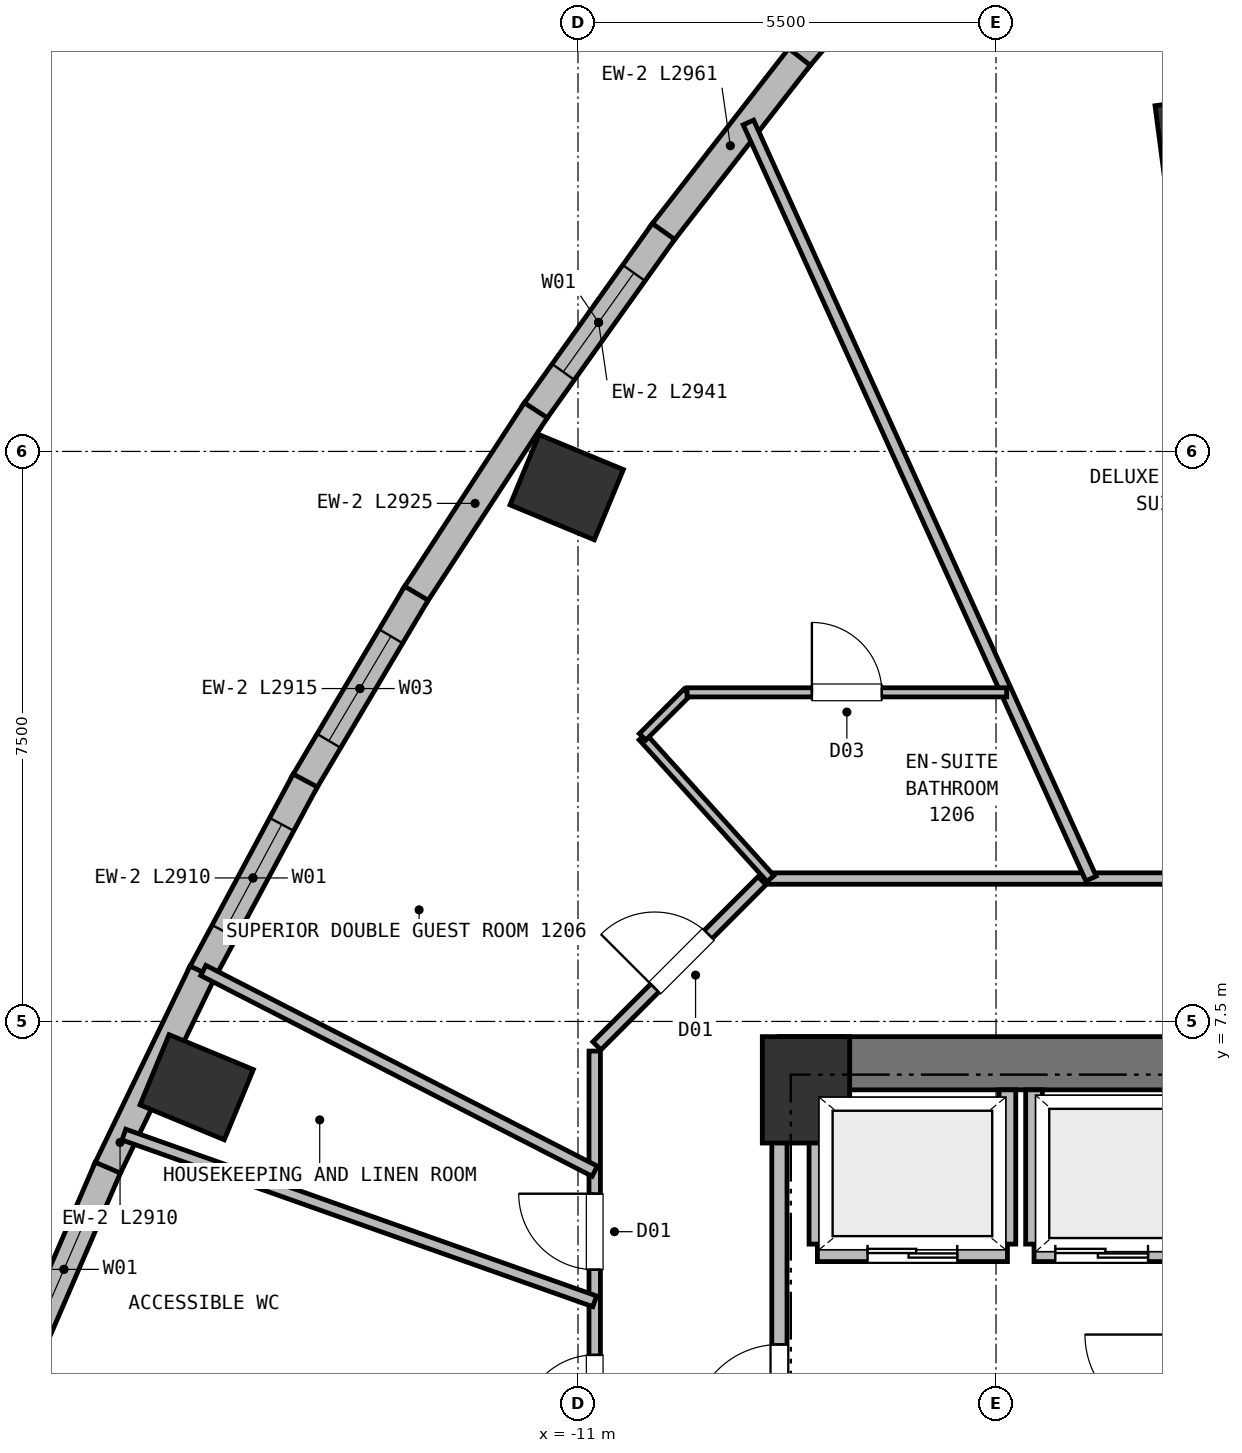
"""IFC4 building model, lengths in metres.
Left out: names, types, materials, properties, quantities, classifications, styles, units other than length and angle.
Written with IfcOpenShell. Run it as: python <this file> out.ifc"""

import sys

from ifc_helpers import new_model, si_unit, direction, frame, frame_2d, origin, origin_2d, place, context, subcontext, project, spatial, rectangle, extrude, element, fill, save


model = new_model("IFC4")
c1 = context("Model", 3, precision=1e-05, world=origin(), true_north=direction((0.0, 1.0)))
c2 = subcontext(c1, "Body", "Model", "MODEL_VIEW")
j1 = project(units=[si_unit("LENGTHUNIT", "METRE"), si_unit("PLANEANGLEUNIT", "RADIAN")], contexts=[c1])
p1 = place(None, origin())
s1 = spatial("IfcSite", under=j1, at=p1, CompositionType="ELEMENT")
p2 = place(p1, origin())
s2 = spatial("IfcBuilding", under=s1, at=p2, CompositionType="ELEMENT")
p3 = place(p2, frame((0.0, 0.0, 41.75)))
s3 = spatial("IfcBuildingStorey", under=s2, at=p3, CompositionType="ELEMENT", Elevation=41.75)
p4 = place(p3, frame((-8.0, 6.6, 0.0), z_axis=(0.0, 0.0, 1.0), x_axis=(1.0, 0.0, 0.0)))
e1 = element("IfcColumn", 1, at=p4, inside=s3, PredefinedType="COLUMN", context=c2, shape_type="SweptSolid", body=[
    extrude(rectangle(XDim=1.15, YDim=1.4, at=origin_2d()), origin(), (0.0, 0.0, 1.0), 3.75),
])
p5 = place(p3, frame((-8.35, 6.95, 0.0), z_axis=(0.0, 0.0, 1.0), x_axis=(1.0, 0.0, 0.0)))
e2 = element("IfcWall", 2, at=p5, inside=s3, PredefinedType="SHEAR", context=c2, shape_type="SweptSolid", body=[
    extrude(rectangle(XDim=16.7, YDim=0.7, at=frame_2d((8.35, 0.0))), origin(), (0.0, 0.0, 1.0), 3.5),
])
p6 = place(p3, frame((-2.2, 18.8, 0.0), z_axis=(0.0, 0.0, 1.0), x_axis=(-0.13052619222, 0.991444861374, 0.0)))
e3 = element("IfcColumn", 3, at=p6, inside=s3, PredefinedType="COLUMN", context=c2, shape_type="SweptSolid", body=[
    extrude(rectangle(XDim=1.8, YDim=2.2, at=origin_2d()), origin(), (0.0, 0.0, 1.0), 3.75),
])
for number, where, z_axis, x_axis in (
    (4, (-11.148, 14.529, 0.0), (0.0, 0.0, 1.0), (0.383, 0.924, 0.0)),
    (5, (-16.017, 6.635, 0.0), (0.0, 0.0, 1.0), (0.383, 0.924, 0.0)),
):
    element("IfcColumn", number, at=place(p3, frame(where, z_axis=z_axis, x_axis=x_axis)), inside=s3, PredefinedType="COLUMN", context=c2, shape_type="SweptSolid", body=[
        extrude(rectangle(XDim=1.0, YDim=1.2, at=origin_2d()), origin(), (0.0, 0.0, 1.0), 3.75),
    ])
p7 = place(p3, frame((-8.117, 20.153, 0.0), z_axis=(0.0, 0.0, 1.0), x_axis=(0.645802996195, 0.763504086502, 0.0)))
e6 = element("IfcWall", 6, at=p7, inside=s3, PredefinedType="SOLIDWALL", context=c2, shape_type="SweptSolid", body=[
    extrude(rectangle(XDim=2.987, YDim=0.36, at=frame_2d((1.493, 0.0))), origin(), (0.0, 0.0, 1.0), 3.5),
])
p8 = place(p7, frame((0.694, 0.0, 0.72)))
e7 = element("IfcOpeningElement", 7, at=p8, cuts=e6, PredefinedType="OPENING", context=c2, shape_type="SweptSolid", body=[
    extrude(rectangle(XDim=1.6, YDim=1.88, at=frame_2d((0.8, 0.94))), frame((0.0, 0.19, 0.0), z_axis=(0.0, -1.0, 0.0), x_axis=(1.0, 0.0, 0.0)), (0.0, 0.0, 1.0), 0.38),
])
p9 = place(p3, frame((-9.905, 17.854, 0.0), z_axis=(0.0, 0.0, 1.0), x_axis=(0.614163171733, 0.789179066174, 0.0)))
e8 = element("IfcWall", 8, at=p9, inside=s3, PredefinedType="SOLIDWALL", context=c2, shape_type="SweptSolid", body=[
    extrude(rectangle(XDim=2.961, YDim=0.36, at=frame_2d((1.481, 0.0))), origin(), (0.0, 0.0, 1.0), 3.5),
])
p10 = place(p3, frame((-11.583, 15.5, 0.0), z_axis=(0.0, 0.0, 1.0), x_axis=(0.580782634392, 0.814058678222, 0.0)))
e9 = element("IfcWall", 9, at=p10, inside=s3, PredefinedType="SOLIDWALL", context=c2, shape_type="SweptSolid", body=[
    extrude(rectangle(XDim=2.941, YDim=0.36, at=frame_2d((1.47, 0.0))), origin(), (0.0, 0.0, 1.0), 3.5),
])
p11 = place(p10, frame((0.67, 0.0, 0.72)))
e10 = element("IfcOpeningElement", 10, at=p11, cuts=e9, PredefinedType="OPENING", context=c2, shape_type="SweptSolid", body=[
    extrude(rectangle(XDim=1.6, YDim=1.88, at=frame_2d((0.8, 0.94))), frame((0.0, 0.19, 0.0), z_axis=(0.0, -1.0, 0.0), x_axis=(1.0, 0.0, 0.0)), (0.0, 0.0, 1.0), 0.38),
])
p12 = place(p3, frame((-13.153, 13.091, 0.0), z_axis=(0.0, 0.0, 1.0), x_axis=(0.546158304601, 0.837681983998, 0.0)))
e11 = element("IfcWall", 11, at=p12, inside=s3, PredefinedType="SOLIDWALL", context=c2, shape_type="SweptSolid", body=[
    extrude(rectangle(XDim=2.925, YDim=0.36, at=frame_2d((1.463, 0.0))), origin(), (0.0, 0.0, 1.0), 3.5),
])
p13 = place(p3, frame((-14.613, 10.626, 0.0), z_axis=(0.0, 0.0, 1.0), x_axis=(0.510091648533, 0.86012005563, 0.0)))
e12 = element("IfcWall", 12, at=p13, inside=s3, PredefinedType="SOLIDWALL", context=c2, shape_type="SweptSolid", body=[
    extrude(rectangle(XDim=2.915, YDim=0.36, at=frame_2d((1.458, 0.0))), origin(), (0.0, 0.0, 1.0), 3.5),
])
p14 = place(p13, frame((0.657, 0.0, 0.72)))
e13 = element("IfcOpeningElement", 13, at=p14, cuts=e12, PredefinedType="OPENING", context=c2, shape_type="SweptSolid", body=[
    extrude(rectangle(XDim=1.6, YDim=1.88, at=frame_2d((0.8, 0.94))), frame((0.0, 0.19, 0.0), z_axis=(0.0, -1.0, 0.0), x_axis=(1.0, 0.0, 0.0)), (0.0, 0.0, 1.0), 0.38),
])
p15 = place(p3, frame((-15.964, 8.106, 0.0), z_axis=(0.0, 0.0, 1.0), x_axis=(0.472903509286, 0.881114221259, 0.0)))
e14 = element("IfcWall", 14, at=p15, inside=s3, PredefinedType="SOLIDWALL", context=c2, shape_type="SweptSolid", body=[
    extrude(rectangle(XDim=2.91, YDim=0.36, at=frame_2d((1.455, 0.0))), origin(), (0.0, 0.0, 1.0), 3.5),
])
p16 = place(p15, frame((0.655, 0.0, 0.72)))
e15 = element("IfcOpeningElement", 15, at=p16, cuts=e14, PredefinedType="OPENING", context=c2, shape_type="SweptSolid", body=[
    extrude(rectangle(XDim=1.6, YDim=1.88, at=frame_2d((0.8, 0.94))), frame((0.0, 0.19, 0.0), z_axis=(0.0, -1.0, 0.0), x_axis=(1.0, 0.0, 0.0)), (0.0, 0.0, 1.0), 0.38),
])
p17 = place(p3, frame((-17.207, 5.531, 0.0), z_axis=(0.0, 0.0, 1.0), x_axis=(0.434819461164, 0.900517649018, 0.0)))
e16 = element("IfcWall", 16, at=p17, inside=s3, PredefinedType="SOLIDWALL", context=c2, shape_type="SweptSolid", body=[
    extrude(rectangle(XDim=2.91, YDim=0.36, at=frame_2d((1.455, 0.0))), origin(), (0.0, 0.0, 1.0), 3.5),
])
p18 = place(p3, frame((-18.341, 2.899, 0.0), z_axis=(0.0, 0.0, 1.0), x_axis=(0.396050960204, 0.918228531969, 0.0)))
e17 = element("IfcWall", 17, at=p18, inside=s3, PredefinedType="SOLIDWALL", context=c2, shape_type="SweptSolid", body=[
    extrude(rectangle(XDim=2.915, YDim=0.36, at=frame_2d((1.458, 0.0))), origin(), (0.0, 0.0, 1.0), 3.5),
])
p19 = place(p18, frame((0.657, 0.0, 0.72)))
e18 = element("IfcOpeningElement", 18, at=p19, cuts=e17, PredefinedType="OPENING", context=c2, shape_type="SweptSolid", body=[
    extrude(rectangle(XDim=1.6, YDim=1.88, at=frame_2d((0.8, 0.94))), frame((0.0, 0.19, 0.0), z_axis=(0.0, -1.0, 0.0), x_axis=(1.0, 0.0, 0.0)), (0.0, 0.0, 1.0), 0.38),
])
p20 = place(p3, frame((-7.85, 4.45, 0.0), z_axis=(0.0, 0.0, 1.0), x_axis=(1.0, 0.0, 0.0)))
e19 = element("IfcWall", 19, at=p20, inside=s3, PredefinedType="PARTITIONING", context=c2, shape_type="SweptSolid", body=[
    extrude(rectangle(XDim=2.5, YDim=0.22, at=frame_2d((1.25, 0.0))), origin(), (0.0, 0.0, 1.0), 3.5),
])
p21 = place(p20, frame((0.66, 0.0, 0.0)))
e20 = element("IfcOpeningElement", 20, at=p21, cuts=e19, PredefinedType="OPENING", context=c2, shape_type="SweptSolid", body=[
    extrude(rectangle(XDim=1.18, YDim=2.15, at=frame_2d((0.59, 1.075))), frame((0.0, 0.12, 0.0), z_axis=(0.0, -1.0, 0.0), x_axis=(1.0, 0.0, 0.0)), (0.0, 0.0, 1.0), 0.24),
])
p22 = place(p3, frame((-7.85, 4.57, 0.0), z_axis=(0.0, 0.0, 1.0), x_axis=(0.0, 1.0, 0.0)))
e21 = element("IfcWall", 21, at=p22, inside=s3, PredefinedType="PARTITIONING", context=c2, shape_type="SweptSolid", body=[
    extrude(rectangle(XDim=2.03, YDim=0.22, at=frame_2d((1.015, 0.0))), origin(), (0.0, 0.0, 1.0), 3.08),
])
p23 = place(p3, frame((-5.35, 4.57, 0.0), z_axis=(0.0, 0.0, 1.0), x_axis=(0.0, 1.0, 0.0)))
e22 = element("IfcWall", 22, at=p23, inside=s3, PredefinedType="PARTITIONING", context=c2, shape_type="SweptSolid", body=[
    extrude(rectangle(XDim=2.03, YDim=0.22, at=frame_2d((1.015, 0.0))), origin(), (0.0, 0.0, 1.0), 3.5),
])
p24 = place(p3, frame((-5.0, 4.45, 0.0), z_axis=(0.0, 0.0, 1.0), x_axis=(1.0, 0.0, 0.0)))
e23 = element("IfcWall", 23, at=p24, inside=s3, PredefinedType="PARTITIONING", context=c2, shape_type="SweptSolid", body=[
    extrude(rectangle(XDim=2.4, YDim=0.22, at=frame_2d((1.2, 0.0))), origin(), (0.0, 0.0, 1.0), 3.5),
])
p25 = place(p24, frame((0.28, 0.0, 0.0)))
e24 = element("IfcOpeningElement", 24, at=p25, cuts=e23, PredefinedType="OPENING", context=c2, shape_type="SweptSolid", body=[
    extrude(rectangle(XDim=1.22, YDim=2.15, at=frame_2d((0.61, 1.075))), frame((0.0, 0.12, 0.0), z_axis=(0.0, -1.0, 0.0), x_axis=(1.0, 0.0, 0.0)), (0.0, 0.0, 1.0), 0.24),
])
p26 = place(p3, frame((-5.0, 4.57, 0.0), z_axis=(0.0, 0.0, 1.0), x_axis=(0.0, 1.0, 0.0)))
e25 = element("IfcWall", 25, at=p26, inside=s3, PredefinedType="PARTITIONING", context=c2, shape_type="SweptSolid", body=[
    extrude(rectangle(XDim=2.03, YDim=0.22, at=frame_2d((1.015, 0.0))), origin(), (0.0, 0.0, 1.0), 3.5),
])
p27 = place(p3, frame((-8.35, 1.15, 0.0), z_axis=(0.0, 0.0, 1.0), x_axis=(0.0, 1.0, 0.0)))
e26 = element("IfcWall", 26, at=p27, inside=s3, PredefinedType="PARTITIONING", context=c2, shape_type="SweptSolid", body=[
    extrude(rectangle(XDim=5.4, YDim=0.2, at=frame_2d((2.7, 0.0))), origin(), (0.0, 0.0, 1.0), 3.5),
])
p28 = place(p27, frame((0.95, 0.0, 0.0)))
e27 = element("IfcOpeningElement", 27, at=p28, cuts=e26, PredefinedType="OPENING", context=c2, shape_type="SweptSolid", body=[
    extrude(rectangle(XDim=1.15, YDim=2.15, at=frame_2d((0.575, 1.075))), frame((0.0, 0.11, 0.0), z_axis=(0.0, -1.0, 0.0), x_axis=(1.0, 0.0, 0.0)), (0.0, 0.0, 1.0), 0.22),
])
p29 = place(p3, frame((-8.51, 9.38, 0.0), z_axis=(0.0, 0.0, 1.0), x_axis=(1.0, 0.0, 0.0)))
e28 = element("IfcWall", 28, at=p29, inside=s3, PredefinedType="PARTITIONING", context=c2, shape_type="SweptSolid", body=[
    extrude(rectangle(XDim=17.02, YDim=0.15, at=frame_2d((8.51, 0.0))), origin(), (0.0, 0.0, 1.0), 3.5),
])
p30 = place(p29, frame((11.971, 0.0, 0.0)))
e29 = element("IfcOpeningElement", 29, at=p30, cuts=e28, PredefinedType="OPENING", context=c2, shape_type="SweptSolid", body=[
    extrude(rectangle(XDim=1.06, YDim=2.15, at=frame_2d((0.53, 1.075))), frame((0.0, 0.085, 0.0), z_axis=(0.0, -1.0, 0.0), x_axis=(1.0, 0.0, 0.0)), (0.0, 0.0, 1.0), 0.17),
])
p31 = place(p29, frame((5.492, 0.0, 0.0)))
e30 = element("IfcOpeningElement", 30, at=p31, cuts=e28, PredefinedType="OPENING", context=c2, shape_type="SweptSolid", body=[
    extrude(rectangle(XDim=1.06, YDim=2.15, at=frame_2d((0.53, 1.075))), frame((0.0, 0.085, 0.0), z_axis=(0.0, -1.0, 0.0), x_axis=(1.0, 0.0, 0.0)), (0.0, 0.0, 1.0), 0.17),
])
p32 = place(p3, frame((-10.752, 7.178, 0.0), z_axis=(0.0, 0.0, 1.0), x_axis=(0.707067066127, 0.707146494016, 0.0)))
e31 = element("IfcWall", 31, at=p32, inside=s3, PredefinedType="PARTITIONING", context=c2, shape_type="SweptSolid", body=[
    extrude(rectangle(XDim=3.074, YDim=0.15, at=frame_2d((1.537, 0.0))), origin(), (0.0, 0.0, 1.0), 3.5),
])
p33 = place(p32, frame((1.077, 0.0, 0.0)))
e32 = element("IfcOpeningElement", 32, at=p33, cuts=e31, PredefinedType="OPENING", context=c2, shape_type="SweptSolid", body=[
    extrude(rectangle(XDim=1.0, YDim=2.15, at=frame_2d((0.5, 1.075))), frame((0.0, 0.085, 0.0), z_axis=(0.0, -1.0, 0.0), x_axis=(1.0, 0.0, 0.0)), (0.0, 0.0, 1.0), 0.17),
])
p34 = place(p3, frame((-10.78, -7.11, 0.0), z_axis=(0.0, 0.0, 1.0), x_axis=(0.0, 1.0, 0.0)))
e33 = element("IfcWall", 33, at=p34, inside=s3, PredefinedType="PARTITIONING", context=c2, shape_type="SweptSolid", body=[
    extrude(rectangle(XDim=14.22, YDim=0.15, at=frame_2d((7.11, 0.0))), origin(), (0.0, 0.0, 1.0), 3.12),
])
p35 = place(p34, frame((11.344, 0.0, 0.0)))
e34 = element("IfcOpeningElement", 34, at=p35, cuts=e33, PredefinedType="OPENING", context=c2, shape_type="SweptSolid", body=[
    extrude(rectangle(XDim=1.0, YDim=2.15, at=frame_2d((0.5, 1.075))), frame((0.0, 0.085, 0.0), z_axis=(0.0, -1.0, 0.0), x_axis=(1.0, 0.0, 0.0)), (0.0, 0.0, 1.0), 0.17),
])
p36 = place(p34, frame((9.272, 0.0, 0.0)))
e35 = element("IfcOpeningElement", 35, at=p36, cuts=e33, PredefinedType="OPENING", context=c2, shape_type="SweptSolid", body=[
    extrude(rectangle(XDim=0.95, YDim=2.1, at=frame_2d((0.475, 1.05))), frame((0.0, 0.085, 0.0), z_axis=(0.0, -1.0, 0.0), x_axis=(1.0, 0.0, 0.0)), (0.0, 0.0, 1.0), 0.17),
])
p37 = place(p34, frame((3.035, 0.0, 0.0)))
e36 = element("IfcOpeningElement", 36, at=p37, cuts=e33, PredefinedType="OPENING", context=c2, shape_type="SweptSolid", body=[
    extrude(rectangle(XDim=1.06, YDim=2.15, at=frame_2d((0.53, 1.075))), frame((0.0, 0.085, 0.0), z_axis=(0.0, -1.0, 0.0), x_axis=(1.0, 0.0, 0.0)), (0.0, 0.0, 1.0), 0.17),
])
p38 = place(p3, frame((-4.25, 9.38, 0.0), z_axis=(0.0, 0.0, 1.0), x_axis=(-0.412704587387, 0.910864931562, 0.0)))
e37 = element("IfcWall", 37, at=p38, inside=s3, PredefinedType="PARTITIONING", context=c2, shape_type="SweptSolid", body=[
    extrude(rectangle(XDim=10.922, YDim=0.15, at=frame_2d((5.461, 0.0))), origin(), (0.0, 0.0, 1.0), 3.5),
])
p39 = place(p3, frame((-10.15, 11.245, 0.0), z_axis=(0.0, 0.0, 1.0), x_axis=(0.670080782296, -0.742288182041, 0.0)))
e38 = element("IfcWall", 38, at=p39, inside=s3, PredefinedType="PARTITIONING", context=c2, shape_type="SweptSolid", body=[
    extrude(rectangle(XDim=2.512, YDim=0.12, at=frame_2d((1.256, 0.0))), origin(), (0.0, 0.0, 1.0), 3.5),
])
p40 = place(p3, frame((-10.15, 11.245, 0.0), z_axis=(0.0, 0.0, 1.0), x_axis=(0.707106781187, 0.707106781187, 0.0)))
e39 = element("IfcWall", 39, at=p40, inside=s3, PredefinedType="PARTITIONING", context=c2, shape_type="SweptSolid", body=[
    extrude(rectangle(XDim=0.828, YDim=0.12, at=frame_2d((0.414, 0.0))), origin(), (0.0, 0.0, 1.0), 3.5),
])
p41 = place(p3, frame((-9.565, 11.83, 0.0), z_axis=(0.0, 0.0, 1.0), x_axis=(1.0, 0.0, 0.0)))
e40 = element("IfcWall", 40, at=p41, inside=s3, PredefinedType="PARTITIONING", context=c2, shape_type="SweptSolid", body=[
    extrude(rectangle(XDim=4.205, YDim=0.12, at=frame_2d((2.102, 0.0))), origin(), (0.0, 0.0, 1.0), 3.5),
])
p42 = place(p41, frame((1.642, 0.0, 0.0)))
e41 = element("IfcOpeningElement", 41, at=p42, cuts=e40, PredefinedType="OPENING", context=c2, shape_type="SweptSolid", body=[
    extrude(rectangle(XDim=0.92, YDim=2.1, at=frame_2d((0.46, 1.05))), frame((0.0, 0.07, 0.0), z_axis=(0.0, -1.0, 0.0), x_axis=(1.0, 0.0, 0.0)), (0.0, 0.0, 1.0), 0.14),
])
p43 = place(p3, frame((-10.78, 5.53, 0.0), z_axis=(0.0, 0.0, 1.0), x_axis=(-0.889781886096, 0.456386015535, 0.0)))
e42 = element("IfcWall", 42, at=p43, inside=s3, PredefinedType="PARTITIONING", context=c2, shape_type="SweptSolid", body=[
    extrude(rectangle(XDim=5.788, YDim=0.15, at=frame_2d((2.894, 0.0))), origin(), (0.0, 0.0, 1.0), 3.5),
])
p44 = place(p3, frame((-10.78, 3.817, 0.0), z_axis=(0.0, 0.0, 1.0), x_axis=(-0.942646221325, 0.333793501167, 0.0)))
e43 = element("IfcWall", 43, at=p44, inside=s3, PredefinedType="PARTITIONING", context=c2, shape_type="SweptSolid", body=[
    extrude(rectangle(XDim=6.572, YDim=0.15, at=frame_2d((3.286, 0.0))), origin(), (0.0, 0.0, 1.0), 3.5),
])
p45 = place(p11, origin())
e44 = element("IfcWindow", 44, at=p45, inside=s3, PartitioningType="SINGLE_PANEL", PredefinedType="WINDOW", context=c2, shape_type="SweptSolid", body=[
    extrude(rectangle(XDim=1.6, YDim=1.88, at=frame_2d((0.8, 0.94))), frame((0.0, 0.03, 0.0), z_axis=(0.0, -1.0, 0.0), x_axis=(1.0, 0.0, 0.0)), (0.0, 0.0, 1.0), 0.06),
])
fill(e10, e44)
p46 = place(p14, origin())
e45 = element("IfcWindow", 45, at=p46, inside=s3, PartitioningType="SINGLE_PANEL", PredefinedType="WINDOW", context=c2, shape_type="SweptSolid", body=[
    extrude(rectangle(XDim=1.6, YDim=1.88, at=frame_2d((0.8, 0.94))), frame((0.0, 0.03, 0.0), z_axis=(0.0, -1.0, 0.0), x_axis=(1.0, 0.0, 0.0)), (0.0, 0.0, 1.0), 0.06),
])
fill(e13, e45)
p47 = place(p16, origin())
e46 = element("IfcWindow", 46, at=p47, inside=s3, PartitioningType="SINGLE_PANEL", PredefinedType="WINDOW", context=c2, shape_type="SweptSolid", body=[
    extrude(rectangle(XDim=1.6, YDim=1.88, at=frame_2d((0.8, 0.94))), frame((0.0, 0.03, 0.0), z_axis=(0.0, -1.0, 0.0), x_axis=(1.0, 0.0, 0.0)), (0.0, 0.0, 1.0), 0.06),
])
fill(e15, e46)
p48 = place(p19, origin())
e47 = element("IfcWindow", 47, at=p48, inside=s3, PartitioningType="SINGLE_PANEL", PredefinedType="WINDOW", context=c2, shape_type="SweptSolid", body=[
    extrude(rectangle(XDim=1.6, YDim=1.88, at=frame_2d((0.8, 0.94))), frame((0.0, 0.03, 0.0), z_axis=(0.0, -1.0, 0.0), x_axis=(1.0, 0.0, 0.0)), (0.0, 0.0, 1.0), 0.06),
])
fill(e18, e47)
p49 = place(p21, origin())
e48 = element("IfcDoor", 48, at=p49, inside=s3, OperationType="DOUBLE_DOOR_SLIDING", PredefinedType="DOOR", context=c2, shape_type="SweptSolid", body=[
    extrude(rectangle(XDim=1.18, YDim=2.15, at=frame_2d((0.59, 1.075))), frame((0.0, 0.025, 0.0), z_axis=(0.0, -1.0, 0.0), x_axis=(1.0, 0.0, 0.0)), (0.0, 0.0, 1.0), 0.05),
])
fill(e20, e48)
p50 = place(p25, origin())
e49 = element("IfcDoor", 49, at=p50, inside=s3, OperationType="DOUBLE_DOOR_SLIDING", PredefinedType="DOOR", context=c2, shape_type="SweptSolid", body=[
    extrude(rectangle(XDim=1.22, YDim=2.15, at=frame_2d((0.61, 1.075))), frame((0.0, 0.025, 0.0), z_axis=(0.0, -1.0, 0.0), x_axis=(1.0, 0.0, 0.0)), (0.0, 0.0, 1.0), 0.05),
])
fill(e24, e49)
p51 = place(p28, origin())
e50 = element("IfcDoor", 50, at=p51, inside=s3, OperationType="SINGLE_SWING_LEFT", PredefinedType="DOOR", context=c2, shape_type="SweptSolid", body=[
    extrude(rectangle(XDim=1.15, YDim=2.15, at=frame_2d((0.575, 1.075))), frame((0.0, 0.025, 0.0), z_axis=(0.0, -1.0, 0.0), x_axis=(1.0, 0.0, 0.0)), (0.0, 0.0, 1.0), 0.05),
])
fill(e27, e50)
p52 = place(p42, origin())
e51 = element("IfcDoor", 51, at=p52, inside=s3, OperationType="SINGLE_SWING_LEFT", PredefinedType="DOOR", context=c2, shape_type="SweptSolid", body=[
    extrude(rectangle(XDim=0.92, YDim=2.1, at=frame_2d((0.46, 1.05))), frame((0.0, 0.025, 0.0), z_axis=(0.0, -1.0, 0.0), x_axis=(1.0, 0.0, 0.0)), (0.0, 0.0, 1.0), 0.05),
])
fill(e41, e51)
p53 = place(p35, origin())
e52 = element("IfcDoor", 52, at=p53, inside=s3, OperationType="SINGLE_SWING_RIGHT", PredefinedType="DOOR", context=c2, shape_type="SweptSolid", body=[
    extrude(rectangle(XDim=1.0, YDim=2.15, at=frame_2d((0.5, 1.075))), frame((0.0, 0.025, 0.0), z_axis=(0.0, -1.0, 0.0), x_axis=(1.0, 0.0, 0.0)), (0.0, 0.0, 1.0), 0.05),
])
fill(e34, e52)
p54 = place(p36, origin())
e53 = element("IfcDoor", 53, at=p54, inside=s3, OperationType="SINGLE_SWING_LEFT", PredefinedType="DOOR", context=c2, shape_type="SweptSolid", body=[
    extrude(rectangle(XDim=0.95, YDim=2.1, at=frame_2d((0.475, 1.05))), frame((0.0, 0.025, 0.0), z_axis=(0.0, -1.0, 0.0), x_axis=(1.0, 0.0, 0.0)), (0.0, 0.0, 1.0), 0.05),
])
fill(e35, e53)
p55 = place(p33, origin())
e54 = element("IfcDoor", 54, at=p55, inside=s3, OperationType="SINGLE_SWING_LEFT", PredefinedType="DOOR", context=c2, shape_type="SweptSolid", body=[
    extrude(rectangle(XDim=1.0, YDim=2.15, at=frame_2d((0.5, 1.075))), frame((0.0, 0.025, 0.0), z_axis=(0.0, -1.0, 0.0), x_axis=(1.0, 0.0, 0.0)), (0.0, 0.0, 1.0), 0.05),
])
fill(e32, e54)
save(model, sys.argv[1])
